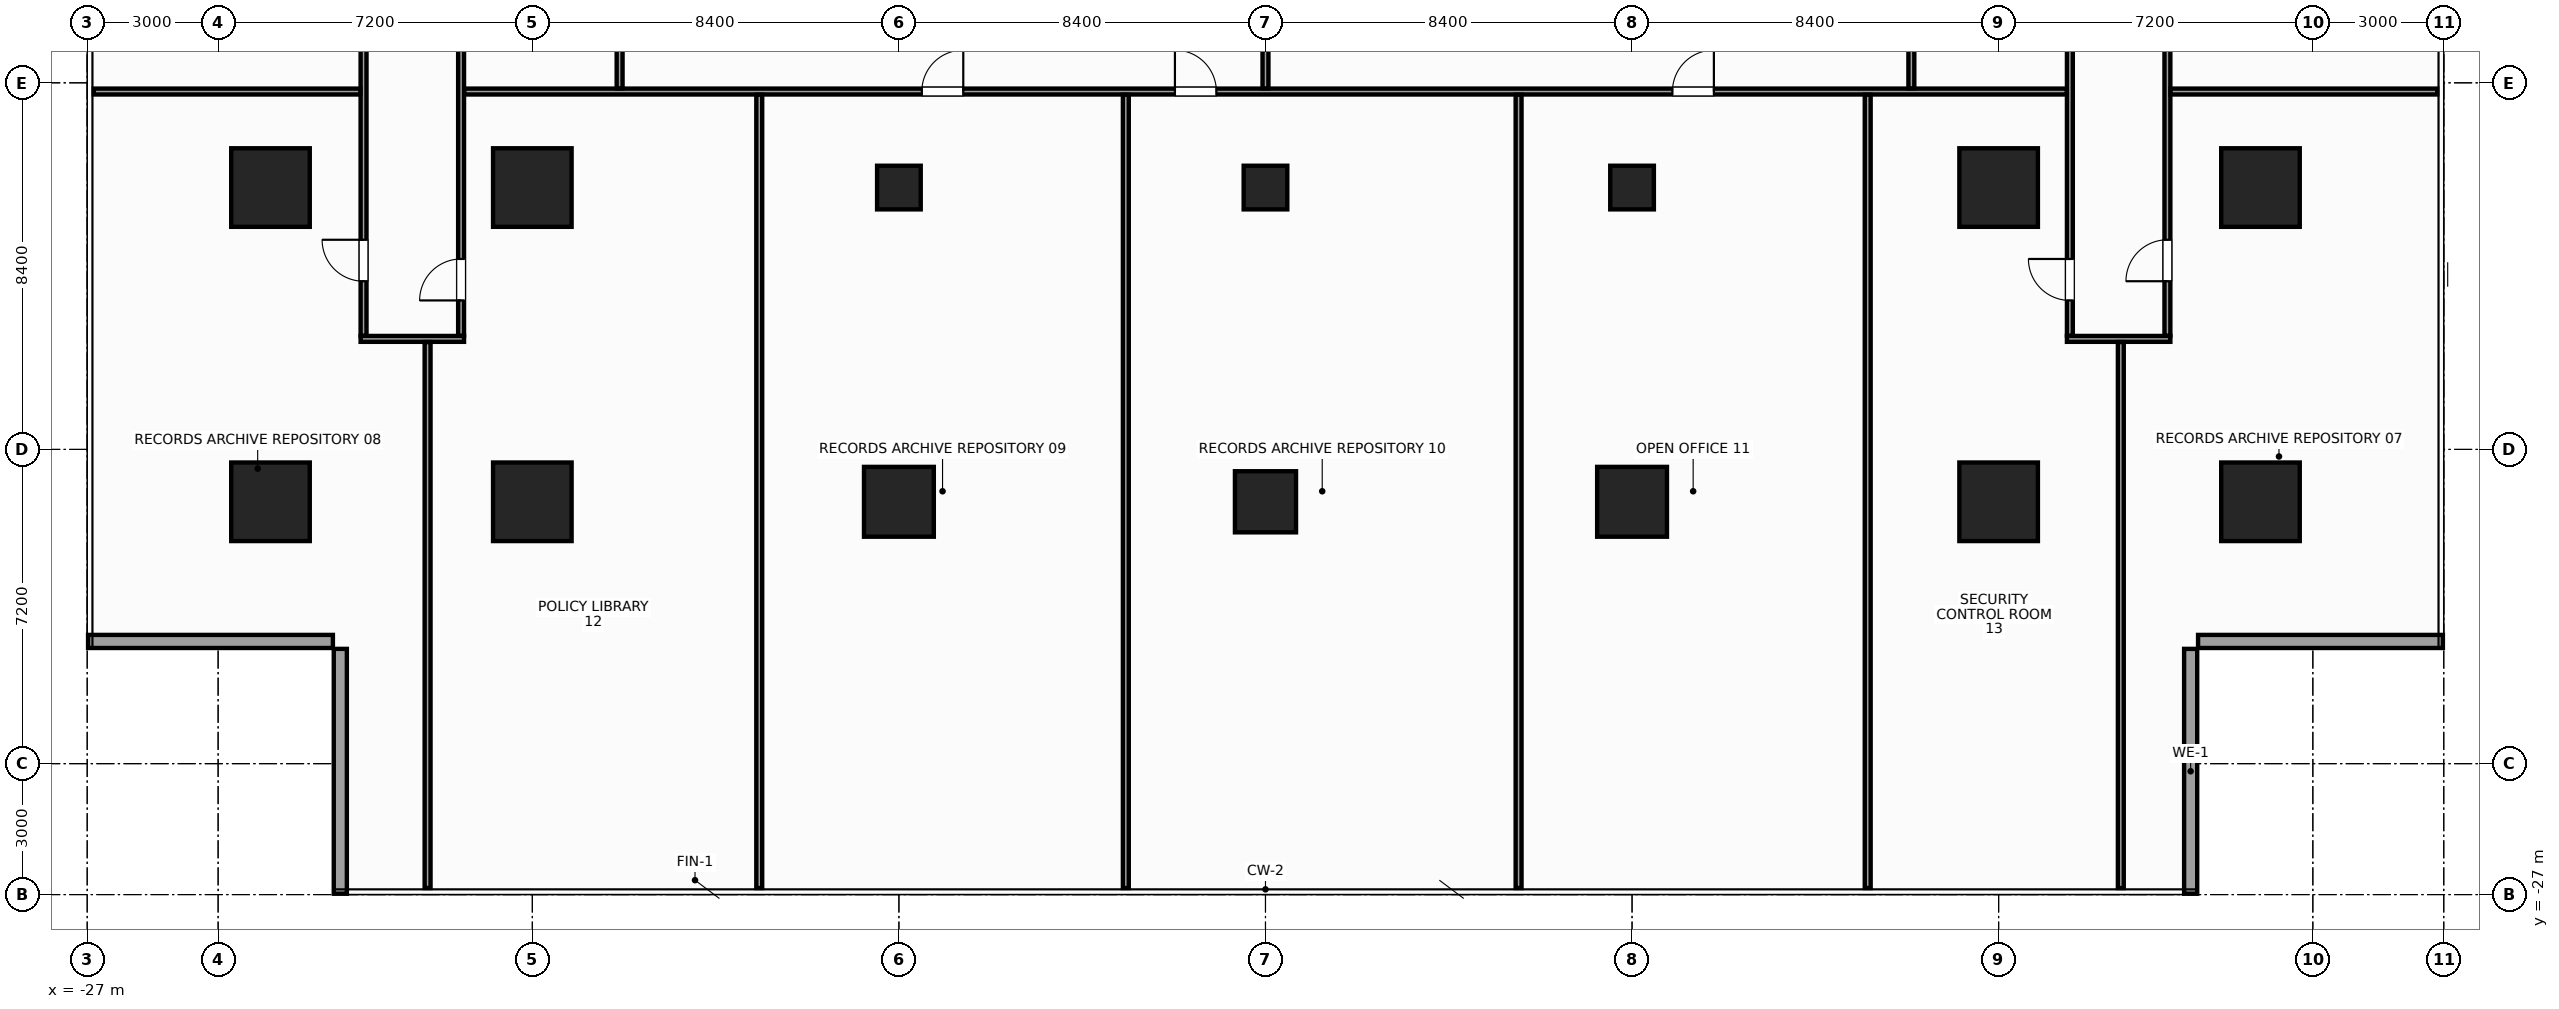
"""IFC4 building model, lengths in metres.
Left out: names, types, materials, properties, quantities, classifications, styles, units other than length and angle.
Written with IfcOpenShell. Run it as: python <this file> out.ifc"""

import sys

from ifc_helpers import new_model, si_unit, direction, frame, frame_2d, origin, origin_2d, place, context, subcontext, project, spatial, rectangle, hollow_rectangle, extrude, source, transform, mapped, element, fill, save


model = new_model("IFC4")
c1 = context("Model", 3, precision=1e-05, world=origin(), true_north=direction((0.0, 1.0)))
c2 = subcontext(c1, "Body", "Model", "MODEL_VIEW")
j1 = project(units=[si_unit("LENGTHUNIT", "METRE"), si_unit("PLANEANGLEUNIT", "RADIAN")], contexts=[c1])
p1 = place(None, origin())
s1 = spatial("IfcSite", under=j1, at=p1, CompositionType="ELEMENT")
p2 = place(p1, origin())
s2 = spatial("IfcBuilding", under=s1, at=p2, CompositionType="ELEMENT")
p3 = place(p2, frame((0.0, 0.0, 38.0)))
s3 = spatial("IfcBuildingStorey", under=s2, at=p3, CompositionType="ELEMENT", Elevation=38.0)
m1 = source(origin(), c2, "Body", "SweptSolid", [
    extrude(rectangle(XDim=1.8, YDim=1.8, at=origin_2d()), origin(), (0.0, 0.0, 1.0), 3.6),
])
for number, where, z_axis, x_axis in (
    (1, (-16.8, -18.0, 0.0), (0.0, 0.0, 1.0), (1.0, 0.0, 0.0)),
    (2, (-16.8, -10.8, 0.0), (0.0, 0.0, 1.0), (1.0, 0.0, 0.0)),
    (3, (16.8, -18.0, 0.0), (0.0, 0.0, 1.0), (1.0, 0.0, 0.0)),
    (4, (16.8, -10.8, 0.0), (0.0, 0.0, 1.0), (1.0, 0.0, 0.0)),
    (5, (-22.8, -18.0, 0.0), (0.0, 0.0, 1.0), (1.0, 0.0, 0.0)),
    (6, (-22.8, -10.8, 0.0), (0.0, 0.0, 1.0), (1.0, 0.0, 0.0)),
    (7, (22.8, -18.0, 0.0), (0.0, 0.0, 1.0), (1.0, 0.0, 0.0)),
    (8, (22.8, -10.8, 0.0), (0.0, 0.0, 1.0), (1.0, 0.0, 0.0)),
):
    element("IfcColumn", number, at=place(p3, frame(where, z_axis=z_axis, x_axis=x_axis)), inside=s3, PredefinedType="COLUMN", context=c2, shape_type="MappedRepresentation", body=[
        mapped(m1, transform((0.0, 0.0, 0.0), x_axis=(1.0, 0.0, 0.0), y_axis=(0.0, 1.0, 0.0), z_axis=(0.0, 0.0, 1.0), scale=1.0)),
    ])
m2 = source(origin(), c2, "Body", "SweptSolid", [
    extrude(rectangle(XDim=1.6, YDim=1.6, at=origin_2d()), origin(), (0.0, 0.0, 1.0), 3.6),
])
p4 = place(p3, frame((-8.4, -18.0, 0.0), z_axis=(0.0, 0.0, 1.0), x_axis=(1.0, 0.0, 0.0)))
e9 = element("IfcColumn", 9, at=p4, inside=s3, PredefinedType="COLUMN", context=c2, shape_type="MappedRepresentation", body=[
    mapped(m2, transform((0.0, 0.0, 0.0), x_axis=(1.0, 0.0, 0.0), y_axis=(0.0, 1.0, 0.0), z_axis=(0.0, 0.0, 1.0), scale=1.0)),
])
m3 = source(origin(), c2, "Body", "SweptSolid", [
    extrude(hollow_rectangle(XDim=1.0, YDim=1.0, WallThickness=0.045, at=origin_2d()), origin(), (0.0, 0.0, 1.0), 3.6),
])
p5 = place(p3, frame((-8.4, -10.8, 0.0), z_axis=(0.0, 0.0, 1.0), x_axis=(1.0, 0.0, 0.0)))
e10 = element("IfcColumn", 10, at=p5, inside=s3, PredefinedType="COLUMN", context=c2, shape_type="MappedRepresentation", body=[
    mapped(m3, transform((0.0, 0.0, 0.0), x_axis=(1.0, 0.0, 0.0), y_axis=(0.0, 1.0, 0.0), z_axis=(0.0, 0.0, 1.0), scale=1.0)),
])
p6 = place(p3, frame((8.4, -18.0, 0.0), z_axis=(0.0, 0.0, 1.0), x_axis=(1.0, 0.0, 0.0)))
e11 = element("IfcColumn", 11, at=p6, inside=s3, PredefinedType="COLUMN", context=c2, shape_type="MappedRepresentation", body=[
    mapped(m2, transform((0.0, 0.0, 0.0), x_axis=(1.0, 0.0, 0.0), y_axis=(0.0, 1.0, 0.0), z_axis=(0.0, 0.0, 1.0), scale=1.0)),
])
p7 = place(p3, frame((8.4, -10.8, 0.0), z_axis=(0.0, 0.0, 1.0), x_axis=(1.0, 0.0, 0.0)))
e12 = element("IfcColumn", 12, at=p7, inside=s3, PredefinedType="COLUMN", context=c2, shape_type="MappedRepresentation", body=[
    mapped(m3, transform((0.0, 0.0, 0.0), x_axis=(1.0, 0.0, 0.0), y_axis=(0.0, 1.0, 0.0), z_axis=(0.0, 0.0, 1.0), scale=1.0)),
])
m4 = source(origin(), c2, "Body", "SweptSolid", [
    extrude(rectangle(XDim=1.4, YDim=1.4, at=origin_2d()), origin(), (0.0, 0.0, 1.0), 3.6),
])
p8 = place(p3, frame((0.0, -18.0, 0.0), z_axis=(0.0, 0.0, 1.0), x_axis=(1.0, 0.0, 0.0)))
e13 = element("IfcColumn", 13, at=p8, inside=s3, PredefinedType="COLUMN", context=c2, shape_type="MappedRepresentation", body=[
    mapped(m4, transform((0.0, 0.0, 0.0), x_axis=(1.0, 0.0, 0.0), y_axis=(0.0, 1.0, 0.0), z_axis=(0.0, 0.0, 1.0), scale=1.0)),
])
m5 = source(origin(), c2, "Body", "SweptSolid", [
    extrude(rectangle(XDim=1.0, YDim=1.0, at=origin_2d()), origin(), (0.0, 0.0, 1.0), 3.6),
])
p9 = place(p3, frame((0.0, -10.8, 0.0), z_axis=(0.0, 0.0, 1.0), x_axis=(1.0, 0.0, 0.0)))
e14 = element("IfcColumn", 14, at=p9, inside=s3, PredefinedType="COLUMN", context=c2, shape_type="MappedRepresentation", body=[
    mapped(m5, transform((0.0, 0.0, 0.0), x_axis=(1.0, 0.0, 0.0), y_axis=(0.0, 1.0, 0.0), z_axis=(0.0, 0.0, 1.0), scale=1.0)),
])
m6 = source(origin(), c2, "Body", "SweptSolid", [
    extrude(rectangle(XDim=5.61, YDim=0.3, at=frame_2d((2.805, 0.0))), origin(), (0.0, 0.0, 1.0), 2.74),
])
for number, where, z_axis, x_axis in (
    (15, (21.2, -26.98, 0.0), (0.0, 0.0, 1.0), (0.0, 1.0, 0.0)),
    (16, (21.37, -21.2, 0.0), (0.0, 0.0, 1.0), (1.0, 0.0, 0.0)),
    (17, (-26.98, -21.2, 0.0), (0.0, 0.0, 1.0), (1.0, 0.0, 0.0)),
    (18, (-21.2, -21.37, 0.0), (0.0, 0.0, 1.0), (0.0, -1.0, 0.0)),
):
    element("IfcWall", number, at=place(p3, frame(where, z_axis=z_axis, x_axis=x_axis)), inside=s3, PredefinedType="STANDARD", context=c2, shape_type="MappedRepresentation", body=[
        mapped(m6, transform((0.0, 0.0, 0.0), x_axis=(1.0, 0.0, 0.0), y_axis=(0.0, 1.0, 0.0), z_axis=(0.0, 0.0, 1.0), scale=1.0)),
    ])
m7 = source(origin(), c2, "Body", "SweptSolid", [
    extrude(rectangle(XDim=2.37, YDim=0.135, at=frame_2d((1.185, 0.0))), origin(), (0.0, 0.0, 1.0), 2.745),
])
for number, where, z_axis, x_axis in (
    (19, (-20.735, -14.268, 0.0), (0.0, 0.0, 1.0), (1.0, 0.0, 0.0)),
    (20, (18.365, -14.268, 0.0), (0.0, 0.0, 1.0), (1.0, 0.0, 0.0)),
):
    element("IfcWall", number, at=place(p3, frame(where, z_axis=z_axis, x_axis=x_axis)), inside=s3, PredefinedType="PARTITIONING", context=c2, shape_type="MappedRepresentation", body=[
        mapped(m7, transform((0.0, 0.0, 0.0), x_axis=(1.0, 0.0, 0.0), y_axis=(0.0, 1.0, 0.0), z_axis=(0.0, 0.0, 1.0), scale=1.0)),
    ])
m8 = source(origin(), c2, "Body", "SweptSolid", [
    extrude(rectangle(XDim=24.123, YDim=0.135, at=frame_2d((12.061, 0.0))), origin(), (0.0, 0.0, 1.0), 2.745),
])
p10 = place(p3, frame((-20.667, -14.195, 0.0), z_axis=(0.0, 0.0, 1.0), x_axis=(0.0, 1.0, 0.0)))
e21 = element("IfcWall", 21, at=p10, inside=s3, PredefinedType="PARTITIONING", context=c2, shape_type="MappedRepresentation", body=[
    mapped(m8, transform((0.0, 0.0, 0.0), x_axis=(1.0, 0.0, 0.0), y_axis=(0.0, 1.0, 0.0), z_axis=(0.0, 0.0, 1.0), scale=1.0)),
])
p11 = place(p10, frame((15.238, 0.0, 0.0)))
e22 = element("IfcOpeningElement", 22, at=p11, cuts=e21, PredefinedType="OPENING", context=c2, shape_type="SweptSolid", body=[
    extrude(rectangle(XDim=0.95, YDim=2.15, at=frame_2d((0.475, 1.075))), frame((0.0, 0.08, 0.0), z_axis=(0.0, -1.0, 0.0), x_axis=(1.0, 0.0, 0.0)), (0.0, 0.0, 1.0), 0.159),
])
p12 = place(p10, frame((1.249, 0.0, 0.0)))
e23 = element("IfcOpeningElement", 23, at=p12, cuts=e21, PredefinedType="OPENING", context=c2, shape_type="SweptSolid", body=[
    extrude(rectangle(XDim=0.95, YDim=2.15, at=frame_2d((0.475, 1.075))), frame((0.0, 0.08, 0.0), z_axis=(0.0, -1.0, 0.0), x_axis=(1.0, 0.0, 0.0)), (0.0, 0.0, 1.0), 0.159),
])
m9 = source(origin(), c2, "Body", "SweptSolid", [
    extrude(rectangle(XDim=21.995, YDim=0.135, at=frame_2d((10.998, 0.0))), origin(), (0.0, 0.0, 1.0), 2.745),
])
p13 = place(p3, frame((-18.433, -14.195, 0.0), z_axis=(0.0, 0.0, 1.0), x_axis=(0.0, 1.0, 0.0)))
e24 = element("IfcWall", 24, at=p13, inside=s3, PredefinedType="PARTITIONING", context=c2, shape_type="MappedRepresentation", body=[
    mapped(m9, transform((0.0, 0.0, 0.0), x_axis=(1.0, 0.0, 0.0), y_axis=(0.0, 1.0, 0.0), z_axis=(0.0, 0.0, 1.0), scale=1.0)),
])
p14 = place(p13, frame((0.809, 0.0, 0.0)))
e25 = element("IfcOpeningElement", 25, at=p14, cuts=e24, PredefinedType="OPENING", context=c2, shape_type="SweptSolid", body=[
    extrude(rectangle(XDim=0.95, YDim=2.15, at=frame_2d((0.475, 1.075))), frame((0.0, 0.08, 0.0), z_axis=(0.0, -1.0, 0.0), x_axis=(1.0, 0.0, 0.0)), (0.0, 0.0, 1.0), 0.159),
])
p15 = place(p3, frame((18.433, -14.195, 0.0), z_axis=(0.0, 0.0, 1.0), x_axis=(0.0, 1.0, 0.0)))
e26 = element("IfcWall", 26, at=p15, inside=s3, PredefinedType="PARTITIONING", context=c2, shape_type="MappedRepresentation", body=[
    mapped(m9, transform((0.0, 0.0, 0.0), x_axis=(1.0, 0.0, 0.0), y_axis=(0.0, 1.0, 0.0), z_axis=(0.0, 0.0, 1.0), scale=1.0)),
])
p16 = place(p15, frame((0.809, 0.0, 0.0)))
e27 = element("IfcOpeningElement", 27, at=p16, cuts=e26, PredefinedType="OPENING", context=c2, shape_type="SweptSolid", body=[
    extrude(rectangle(XDim=0.95, YDim=2.15, at=frame_2d((0.475, 1.075))), frame((0.0, 0.08, 0.0), z_axis=(0.0, -1.0, 0.0), x_axis=(1.0, 0.0, 0.0)), (0.0, 0.0, 1.0), 0.159),
])
p17 = place(p3, frame((20.667, -14.195, 0.0), z_axis=(0.0, 0.0, 1.0), x_axis=(0.0, 1.0, 0.0)))
e28 = element("IfcWall", 28, at=p17, inside=s3, PredefinedType="PARTITIONING", context=c2, shape_type="MappedRepresentation", body=[
    mapped(m8, transform((0.0, 0.0, 0.0), x_axis=(1.0, 0.0, 0.0), y_axis=(0.0, 1.0, 0.0), z_axis=(0.0, 0.0, 1.0), scale=1.0)),
])
p18 = place(p17, frame((15.238, 0.0, 0.0)))
e29 = element("IfcOpeningElement", 29, at=p18, cuts=e28, PredefinedType="OPENING", context=c2, shape_type="SweptSolid", body=[
    extrude(rectangle(XDim=0.95, YDim=2.15, at=frame_2d((0.475, 1.075))), frame((0.0, 0.08, 0.0), z_axis=(0.0, -1.0, 0.0), x_axis=(1.0, 0.0, 0.0)), (0.0, 0.0, 1.0), 0.159),
])
p19 = place(p17, frame((1.249, 0.0, 0.0)))
e30 = element("IfcOpeningElement", 30, at=p19, cuts=e28, PredefinedType="OPENING", context=c2, shape_type="SweptSolid", body=[
    extrude(rectangle(XDim=0.95, YDim=2.15, at=frame_2d((0.475, 1.075))), frame((0.0, 0.08, 0.0), z_axis=(0.0, -1.0, 0.0), x_axis=(1.0, 0.0, 0.0)), (0.0, 0.0, 1.0), 0.159),
])
m10 = source(origin(), c2, "Body", "SweptSolid", [
    extrude(rectangle(XDim=6.11, YDim=0.135, at=frame_2d((3.055, 0.0))), origin(), (0.0, 0.0, 1.0), 2.745),
])
p20 = place(p3, frame((-26.85, -8.6, 0.0), z_axis=(0.0, 0.0, 1.0), x_axis=(1.0, 0.0, 0.0)))
e31 = element("IfcWall", 31, at=p20, inside=s3, PredefinedType="PARTITIONING", context=c2, shape_type="MappedRepresentation", body=[
    mapped(m10, transform((0.0, 0.0, 0.0), x_axis=(1.0, 0.0, 0.0), y_axis=(0.0, 1.0, 0.0), z_axis=(0.0, 0.0, 1.0), scale=1.0)),
])
m11 = source(origin(), c2, "Body", "SweptSolid", [
    extrude(rectangle(XDim=36.72, YDim=0.135, at=frame_2d((18.36, 0.0))), origin(), (0.0, 0.0, 1.0), 2.745),
])
p21 = place(p3, frame((-18.36, -8.6, 0.0), z_axis=(0.0, 0.0, 1.0), x_axis=(1.0, 0.0, 0.0)))
e32 = element("IfcWall", 32, at=p21, inside=s3, PredefinedType="PARTITIONING", context=c2, shape_type="MappedRepresentation", body=[
    mapped(m11, transform((0.0, 0.0, 0.0), x_axis=(1.0, 0.0, 0.0), y_axis=(0.0, 1.0, 0.0), z_axis=(0.0, 0.0, 1.0), scale=1.0)),
])
p22 = place(p21, frame((10.485, 0.0, 0.0)))
e33 = element("IfcOpeningElement", 33, at=p22, cuts=e32, PredefinedType="OPENING", context=c2, shape_type="SweptSolid", body=[
    extrude(rectangle(XDim=0.95, YDim=2.15, at=frame_2d((0.475, 1.075))), frame((0.0, 0.08, 0.0), z_axis=(0.0, -1.0, 0.0), x_axis=(1.0, 0.0, 0.0)), (0.0, 0.0, 1.0), 0.159),
])
p23 = place(p21, frame((16.285, 0.0, 0.0)))
e34 = element("IfcOpeningElement", 34, at=p23, cuts=e32, PredefinedType="OPENING", context=c2, shape_type="SweptSolid", body=[
    extrude(rectangle(XDim=0.95, YDim=2.15, at=frame_2d((0.475, 1.075))), frame((0.0, 0.08, 0.0), z_axis=(0.0, -1.0, 0.0), x_axis=(1.0, 0.0, 0.0)), (0.0, 0.0, 1.0), 0.159),
])
p24 = place(p21, frame((27.685, 0.0, 0.0)))
e35 = element("IfcOpeningElement", 35, at=p24, cuts=e32, PredefinedType="OPENING", context=c2, shape_type="SweptSolid", body=[
    extrude(rectangle(XDim=0.95, YDim=2.15, at=frame_2d((0.475, 1.075))), frame((0.0, 0.08, 0.0), z_axis=(0.0, -1.0, 0.0), x_axis=(1.0, 0.0, 0.0)), (0.0, 0.0, 1.0), 0.159),
])
p25 = place(p3, frame((20.74, -8.6, 0.0), z_axis=(0.0, 0.0, 1.0), x_axis=(1.0, 0.0, 0.0)))
e36 = element("IfcWall", 36, at=p25, inside=s3, PredefinedType="PARTITIONING", context=c2, shape_type="MappedRepresentation", body=[
    mapped(m10, transform((0.0, 0.0, 0.0), x_axis=(1.0, 0.0, 0.0), y_axis=(0.0, 1.0, 0.0), z_axis=(0.0, 0.0, 1.0), scale=1.0)),
])
m12 = source(origin(), c2, "Body", "SweptSolid", [
    extrude(rectangle(XDim=16.188, YDim=0.135, at=frame_2d((8.094, 0.0))), origin(), (0.0, 0.0, 1.0), 2.37),
])
p26 = place(p3, frame((-14.8, -8.528, 0.0), z_axis=(0.0, 0.0, 1.0), x_axis=(0.0, 1.0, 0.0)))
e37 = element("IfcWall", 37, at=p26, inside=s3, PredefinedType="PARTITIONING", context=c2, shape_type="MappedRepresentation", body=[
    mapped(m12, transform((0.0, 0.0, 0.0), x_axis=(1.0, 0.0, 0.0), y_axis=(0.0, 1.0, 0.0), z_axis=(0.0, 0.0, 1.0), scale=1.0)),
])
m13 = source(origin(), c2, "Body", "SweptSolid", [
    extrude(rectangle(XDim=8.018, YDim=0.135, at=frame_2d((4.009, 0.0))), origin(), (0.0, 0.0, 1.0), 2.745),
])
p27 = place(p3, frame((0.0, -8.528, 0.0), z_axis=(0.0, 0.0, 1.0), x_axis=(0.0, 1.0, 0.0)))
e38 = element("IfcWall", 38, at=p27, inside=s3, PredefinedType="PARTITIONING", context=c2, shape_type="MappedRepresentation", body=[
    mapped(m13, transform((0.0, 0.0, 0.0), x_axis=(1.0, 0.0, 0.0), y_axis=(0.0, 1.0, 0.0), z_axis=(0.0, 0.0, 1.0), scale=1.0)),
])
p28 = place(p3, frame((14.8, -8.528, 0.0), z_axis=(0.0, 0.0, 1.0), x_axis=(0.0, 1.0, 0.0)))
e39 = element("IfcWall", 39, at=p28, inside=s3, PredefinedType="PARTITIONING", context=c2, shape_type="MappedRepresentation", body=[
    mapped(m12, transform((0.0, 0.0, 0.0), x_axis=(1.0, 0.0, 0.0), y_axis=(0.0, 1.0, 0.0), z_axis=(0.0, 0.0, 1.0), scale=1.0)),
])
m14 = source(origin(), c2, "Body", "SweptSolid", [
    extrude(rectangle(XDim=12.51, YDim=0.135, at=frame_2d((6.255, 0.0))), origin(), (0.0, 0.0, 1.0), 2.745),
])
p29 = place(p3, frame((-19.2, -26.85, 0.0), z_axis=(0.0, 0.0, 1.0), x_axis=(0.0, 1.0, 0.0)))
e40 = element("IfcWall", 40, at=p29, inside=s3, PredefinedType="PARTITIONING", context=c2, shape_type="MappedRepresentation", body=[
    mapped(m14, transform((0.0, 0.0, 0.0), x_axis=(1.0, 0.0, 0.0), y_axis=(0.0, 1.0, 0.0), z_axis=(0.0, 0.0, 1.0), scale=1.0)),
])
m15 = source(origin(), c2, "Body", "SweptSolid", [
    extrude(rectangle(XDim=18.177, YDim=0.135, at=frame_2d((9.089, 0.0))), origin(), (0.0, 0.0, 1.0), 2.745),
])
for number, where, z_axis, x_axis in (
    (41, (-11.6, -26.85, 0.0), (0.0, 0.0, 1.0), (0.0, 1.0, 0.0)),
    (42, (-3.2, -26.85, 0.0), (0.0, 0.0, 1.0), (0.0, 1.0, 0.0)),
    (43, (5.8, -26.85, 0.0), (0.0, 0.0, 1.0), (0.0, 1.0, 0.0)),
    (44, (13.8, -26.85, 0.0), (0.0, 0.0, 1.0), (0.0, 1.0, 0.0)),
):
    element("IfcWall", number, at=place(p3, frame(where, z_axis=z_axis, x_axis=x_axis)), inside=s3, PredefinedType="PARTITIONING", context=c2, shape_type="MappedRepresentation", body=[
        mapped(m15, transform((0.0, 0.0, 0.0), x_axis=(1.0, 0.0, 0.0), y_axis=(0.0, 1.0, 0.0), z_axis=(0.0, 0.0, 1.0), scale=1.0)),
    ])
p30 = place(p3, frame((19.6, -26.85, 0.0), z_axis=(0.0, 0.0, 1.0), x_axis=(0.0, 1.0, 0.0)))
e45 = element("IfcWall", 45, at=p30, inside=s3, PredefinedType="PARTITIONING", context=c2, shape_type="MappedRepresentation", body=[
    mapped(m14, transform((0.0, 0.0, 0.0), x_axis=(1.0, 0.0, 0.0), y_axis=(0.0, 1.0, 0.0), z_axis=(0.0, 0.0, 1.0), scale=1.0)),
])
m16 = source(origin(), c2, "Body", "SweptSolid", [
    extrude(rectangle(XDim=0.95, YDim=2.15, at=frame_2d((0.475, 1.075))), frame((0.0, 0.025, 0.0), z_axis=(0.0, -1.0, 0.0), x_axis=(1.0, 0.0, 0.0)), (0.0, 0.0, 1.0), 0.05),
])
p31 = place(p19, origin())
e46 = element("IfcDoor", 46, at=p31, inside=s3, OperationType="SINGLE_SWING_LEFT", PredefinedType="DOOR", context=c2, shape_type="MappedRepresentation", body=[
    mapped(m16, transform((0.0, 0.0, 0.0), x_axis=(1.0, 0.0, 0.0), y_axis=(0.0, 1.0, 0.0), z_axis=(0.0, 0.0, 1.0), scale=1.0)),
])
fill(e30, e46)
p32 = place(p12, origin())
e47 = element("IfcDoor", 47, at=p32, inside=s3, OperationType="SINGLE_SWING_RIGHT", PredefinedType="DOOR", context=c2, shape_type="MappedRepresentation", body=[
    mapped(m16, transform((0.0, 0.0, 0.0), x_axis=(1.0, 0.0, 0.0), y_axis=(0.0, 1.0, 0.0), z_axis=(0.0, 0.0, 1.0), scale=1.0)),
])
fill(e23, e47)
p33 = place(p14, origin())
e48 = element("IfcDoor", 48, at=p33, inside=s3, OperationType="SINGLE_SWING_LEFT", PredefinedType="DOOR", context=c2, shape_type="MappedRepresentation", body=[
    mapped(m16, transform((0.0, 0.0, 0.0), x_axis=(1.0, 0.0, 0.0), y_axis=(0.0, 1.0, 0.0), z_axis=(0.0, 0.0, 1.0), scale=1.0)),
])
fill(e25, e48)
p34 = place(p16, origin())
e49 = element("IfcDoor", 49, at=p34, inside=s3, OperationType="SINGLE_SWING_RIGHT", PredefinedType="DOOR", context=c2, shape_type="MappedRepresentation", body=[
    mapped(m16, transform((0.0, 0.0, 0.0), x_axis=(1.0, 0.0, 0.0), y_axis=(0.0, 1.0, 0.0), z_axis=(0.0, 0.0, 1.0), scale=1.0)),
])
fill(e27, e49)
p35 = place(p22, origin())
e50 = element("IfcDoor", 50, at=p35, inside=s3, OperationType="SINGLE_SWING_RIGHT", PredefinedType="DOOR", context=c2, shape_type="MappedRepresentation", body=[
    mapped(m16, transform((0.0, 0.0, 0.0), x_axis=(1.0, 0.0, 0.0), y_axis=(0.0, 1.0, 0.0), z_axis=(0.0, 0.0, 1.0), scale=1.0)),
])
fill(e33, e50)
p36 = place(p23, origin())
e51 = element("IfcDoor", 51, at=p36, inside=s3, OperationType="SINGLE_SWING_LEFT", PredefinedType="DOOR", context=c2, shape_type="MappedRepresentation", body=[
    mapped(m16, transform((0.0, 0.0, 0.0), x_axis=(1.0, 0.0, 0.0), y_axis=(0.0, 1.0, 0.0), z_axis=(0.0, 0.0, 1.0), scale=1.0)),
])
fill(e34, e51)
p37 = place(p24, origin())
e52 = element("IfcDoor", 52, at=p37, inside=s3, OperationType="SINGLE_SWING_RIGHT", PredefinedType="DOOR", context=c2, shape_type="MappedRepresentation", body=[
    mapped(m16, transform((0.0, 0.0, 0.0), x_axis=(1.0, 0.0, 0.0), y_axis=(0.0, 1.0, 0.0), z_axis=(0.0, 0.0, 1.0), scale=1.0)),
])
fill(e35, e52)
save(model, sys.argv[1])
